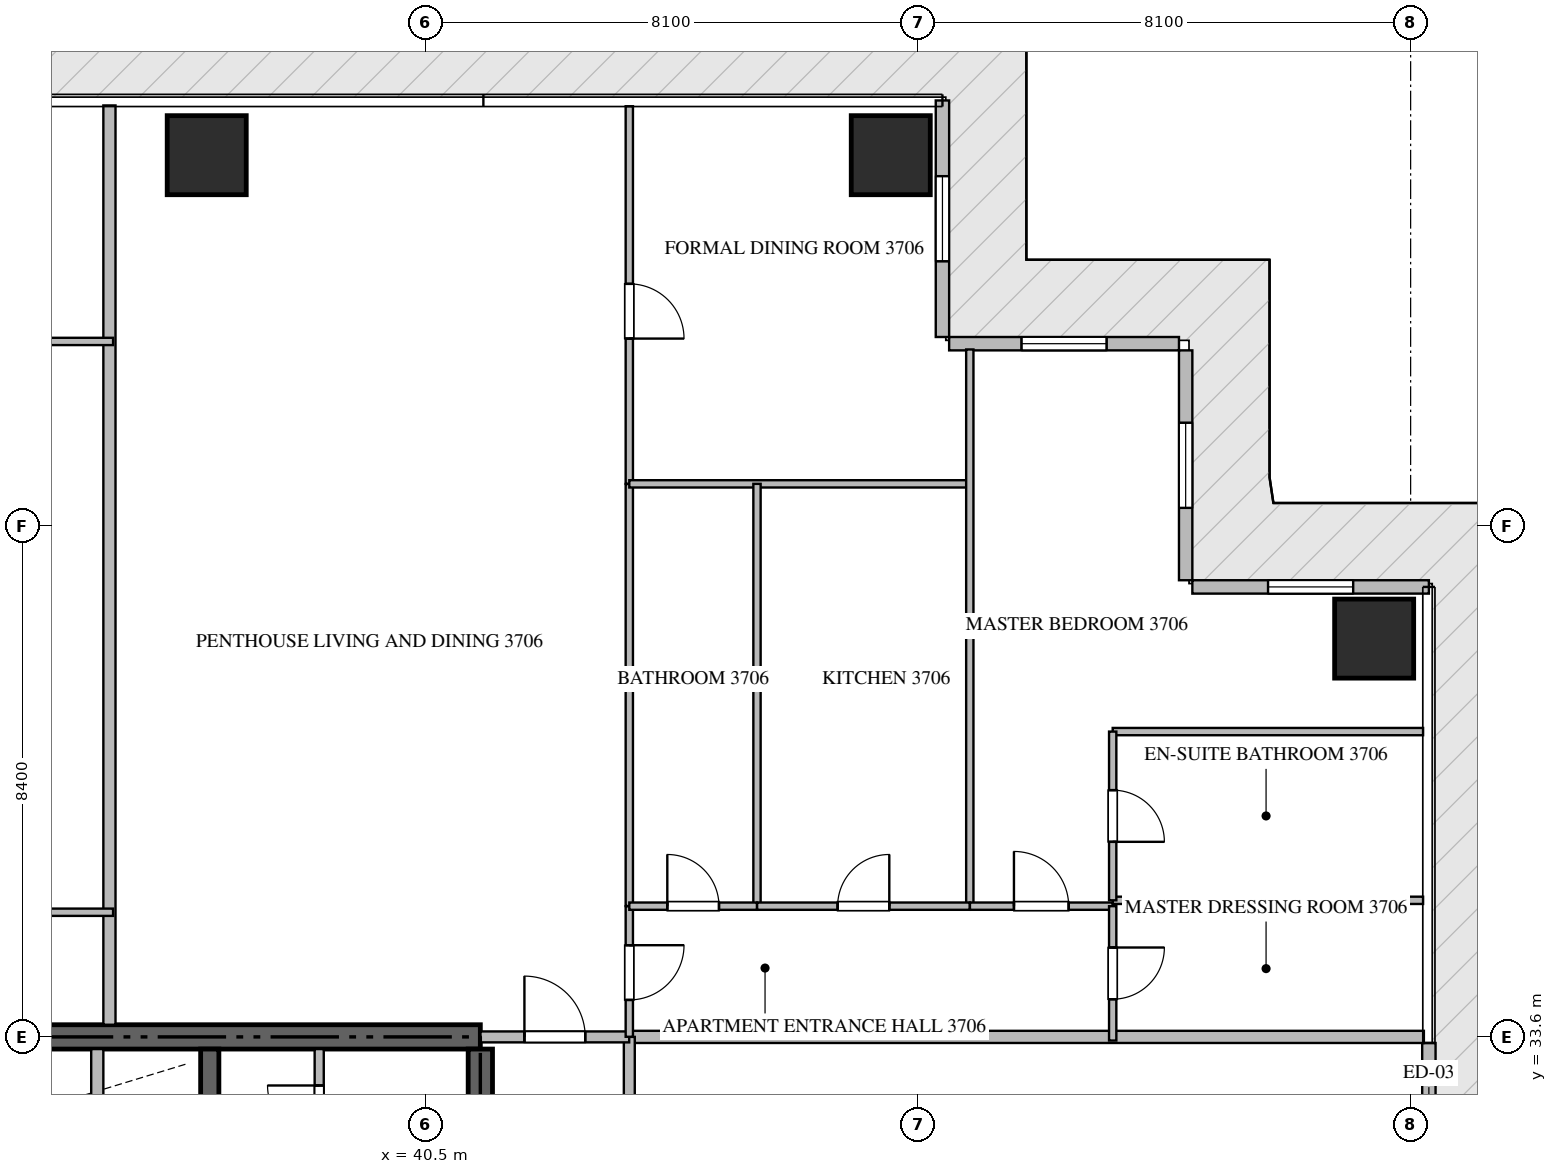
"""IFC4 building model, lengths in metres.
Left out: names, types, materials, properties, quantities, classifications, styles, units other than length and angle.
Written with IfcOpenShell. Run it as: python <this file> out.ifc"""

import sys

from ifc_helpers import new_model, si_unit, direction, frame, frame_2d, origin, origin_2d, place, context, subcontext, project, spatial, rectangle, extrude, source, transform, mapped, element, fill, save


model = new_model("IFC4")
c1 = context("Model", 3, precision=1e-05, world=origin(), true_north=direction((0.0, 1.0)))
c2 = subcontext(c1, "Body", "Model", "MODEL_VIEW")
j1 = project(units=[si_unit("LENGTHUNIT", "METRE"), si_unit("PLANEANGLEUNIT", "RADIAN")], contexts=[c1])
p1 = place(None, origin())
s1 = spatial("IfcSite", under=j1, at=p1, CompositionType="ELEMENT")
p2 = place(p1, origin())
s2 = spatial("IfcBuilding", under=s1, at=p2, CompositionType="ELEMENT")
p3 = place(p2, frame((0.0, 0.0, 150.15)))
s3 = spatial("IfcBuildingStorey", under=s2, at=p3, CompositionType="ELEMENT", Elevation=150.15)
p4 = place(p3, frame((41.4, 33.6, -0.26), z_axis=(0.0, 0.0, 1.0), x_axis=(-1.0, 0.0, 0.0)))
e1 = element("IfcWall", 1, at=p4, inside=s3, PredefinedType="SHEAR", context=c2, shape_type="SweptSolid", body=[
    extrude(rectangle(XDim=18.0, YDim=0.4, at=frame_2d((9.0, 0.0))), origin(), (0.0, 0.0, 1.0), 3.748),
])
p5 = place(p3, frame((41.4, 27.75, -0.26), z_axis=(0.0, 0.0, 1.0), x_axis=(0.0, 1.0, 0.0)))
e2 = element("IfcWall", 2, at=p5, inside=s3, PredefinedType="SHEAR", context=c2, shape_type="SweptSolid", body=[
    extrude(rectangle(XDim=5.65, YDim=0.4, at=frame_2d((2.825, 0.0))), origin(), (0.0, 0.0, 1.0), 3.748),
])
p6 = place(p3, frame((36.95, 27.05, -0.26), z_axis=(0.0, 0.0, 1.0), x_axis=(0.0, 1.0, 0.0)))
e3 = element("IfcWall", 3, at=p6, inside=s3, PredefinedType="SHEAR", context=c2, shape_type="SweptSolid", body=[
    extrude(rectangle(XDim=6.35, YDim=0.3, at=frame_2d((3.175, 0.0))), origin(), (0.0, 0.0, 1.0), 3.748),
])
m1 = source(origin(), c2, "Body", "SweptSolid", [
    extrude(rectangle(XDim=1.3, YDim=1.3, at=origin_2d()), origin(), (0.0, 0.0, 1.0), 3.75),
])
for number, where, z_axis, x_axis in (
    (4, (36.9, 48.1, -0.26), (0.0, 0.0, 1.0), (1.0, 0.0, 0.0)),
    (5, (48.15, 48.1, -0.26), (0.0, 0.0, 1.0), (1.0, 0.0, 0.0)),
    (6, (56.1, 40.15, -0.26), (0.0, 0.0, 1.0), (1.0, 0.0, 0.0)),
):
    element("IfcColumn", number, at=place(p3, frame(where, z_axis=z_axis, x_axis=x_axis)), inside=s3, PredefinedType="COLUMN", context=c2, shape_type="MappedRepresentation", body=[
        mapped(m1, transform((0.0, 0.0, 0.0), scale=1.0)),
    ])
p7 = place(p3, frame((57.0, 30.5, 0.0), z_axis=(0.0, 0.0, 1.0), x_axis=(0.0, 1.0, 0.0)))
e7 = element("IfcWall", 7, at=p7, inside=s3, PredefinedType="ELEMENTEDWALL", context=c2, shape_type="SweptSolid", body=[
    extrude(rectangle(XDim=3.0, YDim=0.22, at=frame_2d((1.5, 0.0))), origin(), (0.0, 0.0, 1.0), 3.475),
])
p8 = place(p7, frame((0.95, 0.0, 0.0)))
e8 = element("IfcOpeningElement", 8, at=p8, cuts=e7, PredefinedType="OPENING", context=c2, shape_type="SweptSolid", body=[
    extrude(rectangle(XDim=1.1, YDim=2.2, at=frame_2d((0.55, 1.1))), frame((0.0, 0.12, 0.0), z_axis=(0.0, -1.0, 0.0), x_axis=(1.0, 0.0, 0.0)), (0.0, 0.0, 1.0), 0.24),
])
p9 = place(p3, frame((57.0, 41.0, 0.0), z_axis=(0.0, 0.0, 1.0), x_axis=(-1.0, 0.0, 0.0)))
e9 = element("IfcWall", 9, at=p9, inside=s3, PredefinedType="ELEMENTEDWALL", context=c2, shape_type="SweptSolid", body=[
    extrude(rectangle(XDim=3.89, YDim=0.22, at=frame_2d((1.945, 0.0))), origin(), (0.0, 0.0, 1.0), 3.475),
])
p10 = place(p9, frame((1.245, 0.0, 0.65)))
e10 = element("IfcOpeningElement", 10, at=p10, cuts=e9, PredefinedType="OPENING", context=c2, shape_type="SweptSolid", body=[
    extrude(rectangle(XDim=1.4, YDim=2.05, at=frame_2d((0.7, 1.025))), frame((0.0, 0.12, 0.0), z_axis=(0.0, -1.0, 0.0), x_axis=(1.0, 0.0, 0.0)), (0.0, 0.0, 1.0), 0.24),
])
p11 = place(p3, frame((53.0, 41.11, 0.0), z_axis=(0.0, 0.0, 1.0), x_axis=(0.0, 1.0, 0.0)))
e11 = element("IfcWall", 11, at=p11, inside=s3, PredefinedType="ELEMENTEDWALL", context=c2, shape_type="SweptSolid", body=[
    extrude(rectangle(XDim=3.78, YDim=0.22, at=frame_2d((1.89, 0.0))), origin(), (0.0, 0.0, 1.0), 3.475),
])
p12 = place(p11, frame((1.19, 0.0, 0.65)))
e12 = element("IfcOpeningElement", 12, at=p12, cuts=e11, PredefinedType="OPENING", context=c2, shape_type="SweptSolid", body=[
    extrude(rectangle(XDim=1.4, YDim=2.05, at=frame_2d((0.7, 1.025))), frame((0.0, 0.12, 0.0), z_axis=(0.0, -1.0, 0.0), x_axis=(1.0, 0.0, 0.0)), (0.0, 0.0, 1.0), 0.24),
])
p13 = place(p3, frame((52.89, 45.0, 0.0), z_axis=(0.0, 0.0, 1.0), x_axis=(-1.0, 0.0, 0.0)))
e13 = element("IfcWall", 13, at=p13, inside=s3, PredefinedType="ELEMENTEDWALL", context=c2, shape_type="SweptSolid", body=[
    extrude(rectangle(XDim=3.78, YDim=0.22, at=frame_2d((1.89, 0.0))), origin(), (0.0, 0.0, 1.0), 3.475),
])
p14 = place(p13, frame((1.19, 0.0, 0.65)))
e14 = element("IfcOpeningElement", 14, at=p14, cuts=e13, PredefinedType="OPENING", context=c2, shape_type="SweptSolid", body=[
    extrude(rectangle(XDim=1.4, YDim=2.05, at=frame_2d((0.7, 1.025))), frame((0.0, 0.12, 0.0), z_axis=(0.0, -1.0, 0.0), x_axis=(1.0, 0.0, 0.0)), (0.0, 0.0, 1.0), 0.24),
])
p15 = place(p3, frame((49.0, 45.11, 0.0), z_axis=(0.0, 0.0, 1.0), x_axis=(0.0, 1.0, 0.0)))
e15 = element("IfcWall", 15, at=p15, inside=s3, PredefinedType="ELEMENTEDWALL", context=c2, shape_type="SweptSolid", body=[
    extrude(rectangle(XDim=3.89, YDim=0.22, at=frame_2d((1.945, 0.0))), origin(), (0.0, 0.0, 1.0), 3.475),
])
p16 = place(p15, frame((1.245, 0.0, 0.65)))
e16 = element("IfcOpeningElement", 16, at=p16, cuts=e15, PredefinedType="OPENING", context=c2, shape_type="SweptSolid", body=[
    extrude(rectangle(XDim=1.4, YDim=2.05, at=frame_2d((0.7, 1.025))), frame((0.0, 0.12, 0.0), z_axis=(0.0, -1.0, 0.0), x_axis=(1.0, 0.0, 0.0)), (0.0, 0.0, 1.0), 0.24),
])
p17 = place(p3, frame((35.1, 30.75, 0.0), z_axis=(0.0, 0.0, 1.0), x_axis=(0.0, 1.0, 0.0)))
e17 = element("IfcWall", 17, at=p17, inside=s3, PredefinedType="STANDARD", context=c2, shape_type="SweptSolid", body=[
    extrude(rectangle(XDim=2.65, YDim=0.2, at=frame_2d((1.325, 0.0))), origin(), (0.0, 0.0, 1.0), 3.49),
])
p18 = place(p3, frame((38.75, 31.352, 0.0), z_axis=(0.0, 0.0, 1.0), x_axis=(0.0, 1.0, 0.0)))
e18 = element("IfcWall", 18, at=p18, inside=s3, PredefinedType="PARTITIONING", context=c2, shape_type="SweptSolid", body=[
    extrude(rectangle(XDim=2.048, YDim=0.15, at=frame_2d((1.024, 0.0))), origin(), (0.0, 0.0, 1.0), 3.49),
])
p19 = place(p18, frame((0.599, 0.0, 0.0)))
e19 = element("IfcOpeningElement", 19, at=p19, cuts=e18, PredefinedType="OPENING", context=c2, shape_type="SweptSolid", body=[
    extrude(rectangle(XDim=0.85, YDim=2.1, at=frame_2d((0.425, 1.05))), frame((0.0, 0.085, 0.0), z_axis=(0.0, -1.0, 0.0), x_axis=(1.0, 0.0, 0.0)), (0.0, 0.0, 1.0), 0.17),
])
p20 = place(p3, frame((35.3, 33.8, 0.0), z_axis=(0.0, 0.0, 1.0), x_axis=(0.0, 1.0, 0.0)))
e20 = element("IfcWall", 20, at=p20, inside=s3, PredefinedType="PARTITIONING", context=c2, shape_type="SweptSolid", body=[
    extrude(rectangle(XDim=15.118, YDim=0.2, at=frame_2d((7.559, 0.0))), origin(), (0.0, 0.0, 1.0), 3.49),
])
p21 = place(p3, frame((43.85, 33.6, 0.0), z_axis=(0.0, 0.0, 1.0), x_axis=(1.0, 0.0, 0.0)))
e21 = element("IfcWall", 21, at=p21, inside=s3, PredefinedType="PARTITIONING", context=c2, shape_type="SweptSolid", body=[
    extrude(rectangle(XDim=13.068, YDim=0.2, at=frame_2d((6.534, 0.0))), origin(), (0.0, 0.0, 1.0), 3.49),
])
p22 = place(p3, frame((43.85, 14.9, 0.0), z_axis=(0.0, 0.0, 1.0), x_axis=(0.0, 1.0, 0.0)))
e22 = element("IfcWall", 22, at=p22, inside=s3, PredefinedType="PARTITIONING", context=c2, shape_type="SweptSolid", body=[
    extrude(rectangle(XDim=18.7, YDim=0.18, at=frame_2d((9.35, 0.0))), origin(), (0.0, 0.0, 1.0), 3.49),
])
p23 = place(p22, frame((14.603, 0.0, 0.0)))
e23 = element("IfcOpeningElement", 23, at=p23, cuts=e22, PredefinedType="OPENING", context=c2, shape_type="SweptSolid", body=[
    extrude(rectangle(XDim=1.0, YDim=2.15, at=frame_2d((0.5, 1.075))), frame((0.0, 0.1, 0.0), z_axis=(0.0, -1.0, 0.0), x_axis=(1.0, 0.0, 0.0)), (0.0, 0.0, 1.0), 0.2),
])
p24 = place(p3, frame((41.402, 33.6, 0.0), z_axis=(0.0, 0.0, 1.0), x_axis=(1.0, 0.0, 0.0)))
e24 = element("IfcWall", 24, at=p24, inside=s3, PredefinedType="PARTITIONING", context=c2, shape_type="SweptSolid", body=[
    extrude(rectangle(XDim=2.446, YDim=0.18, at=frame_2d((1.223, 0.0))), origin(), (0.0, 0.0, 1.0), 3.49),
])
p25 = place(p24, frame((0.723, 0.0, 0.0)))
e25 = element("IfcOpeningElement", 25, at=p25, cuts=e24, PredefinedType="OPENING", context=c2, shape_type="SweptSolid", body=[
    extrude(rectangle(XDim=1.0, YDim=2.15, at=frame_2d((0.5, 1.075))), frame((0.0, 0.1, 0.0), z_axis=(0.0, -1.0, 0.0), x_axis=(1.0, 0.0, 0.0)), (0.0, 0.0, 1.0), 0.2),
])
for number, where, z_axis, x_axis in (
    (26, (26.3, 45.037, 0.0), (0.0, 0.0, 1.0), (1.0, 0.0, 0.0)),
    (27, (26.3, 35.65, 0.0), (0.0, 0.0, 1.0), (1.0, 0.0, 0.0)),
):
    element("IfcWall", number, at=place(p3, frame(where, z_axis=z_axis, x_axis=x_axis)), inside=s3, PredefinedType="PARTITIONING", context=c2, shape_type="SweptSolid", body=[
        extrude(rectangle(XDim=9.06, YDim=0.12, at=frame_2d((4.53, 0.0))), origin(), (0.0, 0.0, 1.0), 3.49),
    ])
p26 = place(p3, frame((43.85, 35.75, 0.0), z_axis=(0.0, 0.0, 1.0), x_axis=(0.0, -1.0, 0.0)))
e28 = element("IfcWall", 28, at=p26, inside=s3, PredefinedType="PARTITIONING", context=c2, shape_type="SweptSolid", body=[
    extrude(rectangle(XDim=2.148, YDim=0.12, at=frame_2d((1.074, 0.0))), origin(), (0.0, 0.0, 1.0), 3.49),
])
p27 = place(p26, frame((0.642, 0.0, 0.0)))
e29 = element("IfcOpeningElement", 29, at=p27, cuts=e28, PredefinedType="OPENING", context=c2, shape_type="SweptSolid", body=[
    extrude(rectangle(XDim=0.9, YDim=2.1, at=frame_2d((0.45, 1.05))), frame((0.0, 0.07, 0.0), z_axis=(0.0, -1.0, 0.0), x_axis=(1.0, 0.0, 0.0)), (0.0, 0.0, 1.0), 0.14),
])
p28 = place(p3, frame((43.85, 48.905, 0.0), z_axis=(0.0, 0.0, 1.0), x_axis=(0.0, -1.0, 0.0)))
e30 = element("IfcWall", 30, at=p28, inside=s3, PredefinedType="PARTITIONING", context=c2, shape_type="SweptSolid", body=[
    extrude(rectangle(XDim=6.21, YDim=0.12, at=frame_2d((3.105, 0.0))), origin(), (0.0, 0.0, 1.0), 3.49),
])
p29 = place(p28, frame((2.921, 0.0, 0.0)))
e31 = element("IfcOpeningElement", 31, at=p29, cuts=e30, PredefinedType="OPENING", context=c2, shape_type="SweptSolid", body=[
    extrude(rectangle(XDim=0.9, YDim=2.1, at=frame_2d((0.45, 1.05))), frame((0.0, 0.07, 0.0), z_axis=(0.0, -1.0, 0.0), x_axis=(1.0, 0.0, 0.0)), (0.0, 0.0, 1.0), 0.14),
])
p30 = place(p3, frame((43.85, 42.693, 0.0), z_axis=(0.0, 0.0, 1.0), x_axis=(0.0, -1.0, 0.0)))
e32 = element("IfcWall", 32, at=p30, inside=s3, PredefinedType="PARTITIONING", context=c2, shape_type="SweptSolid", body=[
    extrude(rectangle(XDim=6.941, YDim=0.12, at=frame_2d((3.471, 0.0))), origin(), (0.0, 0.0, 1.0), 3.49),
])
p31 = place(p3, frame((43.85, 42.695, 0.0), z_axis=(0.0, 0.0, 1.0), x_axis=(1.0, 0.0, 0.0)))
e33 = element("IfcWall", 33, at=p31, inside=s3, PredefinedType="PARTITIONING", context=c2, shape_type="SweptSolid", body=[
    extrude(rectangle(XDim=5.6, YDim=0.12, at=frame_2d((2.8, 0.0))), origin(), (0.0, 0.0, 1.0), 3.49),
])
p32 = place(p3, frame((49.45, 44.905, 0.0), z_axis=(0.0, 0.0, 1.0), x_axis=(0.0, -1.0, 0.0)))
e34 = element("IfcWall", 34, at=p32, inside=s3, PredefinedType="PARTITIONING", context=c2, shape_type="SweptSolid", body=[
    extrude(rectangle(XDim=9.155, YDim=0.12, at=frame_2d((4.578, 0.0))), origin(), (0.0, 0.0, 1.0), 3.49),
])
p33 = place(p3, frame((45.95, 42.695, 0.0), z_axis=(0.0, 0.0, 1.0), x_axis=(0.0, -1.0, 0.0)))
e35 = element("IfcWall", 35, at=p33, inside=s3, PredefinedType="PARTITIONING", context=c2, shape_type="SweptSolid", body=[
    extrude(rectangle(XDim=6.945, YDim=0.12, at=frame_2d((3.473, 0.0))), origin(), (0.0, 0.0, 1.0), 3.49),
])
p34 = place(p3, frame((43.85, 35.75, 0.0), z_axis=(0.0, 0.0, 1.0), x_axis=(1.0, 0.0, 0.0)))
e36 = element("IfcWall", 36, at=p34, inside=s3, PredefinedType="PARTITIONING", context=c2, shape_type="SweptSolid", body=[
    extrude(rectangle(XDim=2.1, YDim=0.12, at=frame_2d((1.05, 0.0))), origin(), (0.0, 0.0, 1.0), 3.49),
])
p35 = place(p34, frame((0.625, 0.0, 0.0)))
e37 = element("IfcOpeningElement", 37, at=p35, cuts=e36, PredefinedType="OPENING", context=c2, shape_type="SweptSolid", body=[
    extrude(rectangle(XDim=0.85, YDim=2.1, at=frame_2d((0.425, 1.05))), frame((0.0, 0.07, 0.0), z_axis=(0.0, -1.0, 0.0), x_axis=(1.0, 0.0, 0.0)), (0.0, 0.0, 1.0), 0.14),
])
p36 = place(p3, frame((45.952, 35.75, 0.0), z_axis=(0.0, 0.0, 1.0), x_axis=(1.0, 0.0, 0.0)))
e38 = element("IfcWall", 38, at=p36, inside=s3, PredefinedType="PARTITIONING", context=c2, shape_type="SweptSolid", body=[
    extrude(rectangle(XDim=3.498, YDim=0.12, at=frame_2d((1.749, 0.0))), origin(), (0.0, 0.0, 1.0), 3.49),
])
p37 = place(p36, frame((1.324, 0.0, 0.0)))
e39 = element("IfcOpeningElement", 39, at=p37, cuts=e38, PredefinedType="OPENING", context=c2, shape_type="SweptSolid", body=[
    extrude(rectangle(XDim=0.85, YDim=2.1, at=frame_2d((0.425, 1.05))), frame((0.0, 0.07, 0.0), z_axis=(0.0, -1.0, 0.0), x_axis=(1.0, 0.0, 0.0)), (0.0, 0.0, 1.0), 0.14),
])
p38 = place(p3, frame((49.452, 35.75, 0.0), z_axis=(0.0, 0.0, 1.0), x_axis=(1.0, 0.0, 0.0)))
e40 = element("IfcWall", 40, at=p38, inside=s3, PredefinedType="PARTITIONING", context=c2, shape_type="SweptSolid", body=[
    extrude(rectangle(XDim=2.348, YDim=0.12, at=frame_2d((1.174, 0.0))), origin(), (0.0, 0.0, 1.0), 3.49),
])
p39 = place(p38, frame((0.724, 0.0, 0.0)))
e41 = element("IfcOpeningElement", 41, at=p39, cuts=e40, PredefinedType="OPENING", context=c2, shape_type="SweptSolid", body=[
    extrude(rectangle(XDim=0.9, YDim=2.1, at=frame_2d((0.45, 1.05))), frame((0.0, 0.07, 0.0), z_axis=(0.0, -1.0, 0.0), x_axis=(1.0, 0.0, 0.0)), (0.0, 0.0, 1.0), 0.14),
])
p40 = place(p3, frame((51.8, 38.621, 0.0), z_axis=(0.0, 0.0, 1.0), x_axis=(1.0, 0.0, 0.0)))
e42 = element("IfcWall", 42, at=p40, inside=s3, PredefinedType="PARTITIONING", context=c2, shape_type="SweptSolid", body=[
    extrude(rectangle(XDim=5.105, YDim=0.12, at=frame_2d((2.552, 0.0))), origin(), (0.0, 0.0, 1.0), 3.49),
])
p41 = place(p3, frame((51.802, 35.846, 0.0), z_axis=(0.0, 0.0, 1.0), x_axis=(1.0, 0.0, 0.0)))
e43 = element("IfcWall", 43, at=p41, inside=s3, PredefinedType="PARTITIONING", context=c2, shape_type="SweptSolid", body=[
    extrude(rectangle(XDim=5.103, YDim=0.12, at=frame_2d((2.552, 0.0))), origin(), (0.0, 0.0, 1.0), 3.49),
])
p42 = place(p3, frame((51.8, 38.621, 0.0), z_axis=(0.0, 0.0, 1.0), x_axis=(0.0, -1.0, 0.0)))
e44 = element("IfcWall", 44, at=p42, inside=s3, PredefinedType="PARTITIONING", context=c2, shape_type="SweptSolid", body=[
    extrude(rectangle(XDim=2.775, YDim=0.12, at=frame_2d((1.388, 0.0))), origin(), (0.0, 0.0, 1.0), 3.49),
])
p43 = place(p42, frame((0.963, 0.0, 0.0)))
e45 = element("IfcOpeningElement", 45, at=p43, cuts=e44, PredefinedType="OPENING", context=c2, shape_type="SweptSolid", body=[
    extrude(rectangle(XDim=0.85, YDim=2.1, at=frame_2d((0.425, 1.05))), frame((0.0, 0.07, 0.0), z_axis=(0.0, -1.0, 0.0), x_axis=(1.0, 0.0, 0.0)), (0.0, 0.0, 1.0), 0.14),
])
p44 = place(p3, frame((51.8, 35.75, 0.0), z_axis=(0.0, 0.0, 1.0), x_axis=(0.0, -1.0, 0.0)))
e46 = element("IfcWall", 46, at=p44, inside=s3, PredefinedType="PARTITIONING", context=c2, shape_type="SweptSolid", body=[
    extrude(rectangle(XDim=2.21, YDim=0.12, at=frame_2d((1.105, 0.0))), origin(), (0.0, 0.0, 1.0), 3.49),
])
p45 = place(p44, frame((0.68, 0.0, 0.0)))
e47 = element("IfcOpeningElement", 47, at=p45, cuts=e46, PredefinedType="OPENING", context=c2, shape_type="SweptSolid", body=[
    extrude(rectangle(XDim=0.85, YDim=2.1, at=frame_2d((0.425, 1.05))), frame((0.0, 0.07, 0.0), z_axis=(0.0, -1.0, 0.0), x_axis=(1.0, 0.0, 0.0)), (0.0, 0.0, 1.0), 0.14),
])
m2 = source(origin(), c2, "Body", "SweptSolid", [
    extrude(rectangle(XDim=1.4, YDim=2.05, at=frame_2d((0.7, 1.025))), frame((0.0, 0.03, 0.0), z_axis=(0.0, -1.0, 0.0), x_axis=(1.0, 0.0, 0.0)), (0.0, 0.0, 1.0), 0.06),
])
p46 = place(p10, origin())
e48 = element("IfcWindow", 48, at=p46, inside=s3, PartitioningType="SINGLE_PANEL", PredefinedType="WINDOW", context=c2, shape_type="MappedRepresentation", body=[
    mapped(m2, transform((0.0, 0.0, 0.0), scale=1.0)),
])
fill(e10, e48)
p47 = place(p12, origin())
e49 = element("IfcWindow", 49, at=p47, inside=s3, PartitioningType="SINGLE_PANEL", PredefinedType="WINDOW", context=c2, shape_type="MappedRepresentation", body=[
    mapped(m2, transform((0.0, 0.0, 0.0), scale=1.0)),
])
fill(e12, e49)
p48 = place(p14, origin())
e50 = element("IfcWindow", 50, at=p48, inside=s3, PartitioningType="SINGLE_PANEL", PredefinedType="WINDOW", context=c2, shape_type="MappedRepresentation", body=[
    mapped(m2, transform((0.0, 0.0, 0.0), scale=1.0)),
])
fill(e14, e50)
p49 = place(p16, origin())
e51 = element("IfcWindow", 51, at=p49, inside=s3, PartitioningType="SINGLE_PANEL", PredefinedType="WINDOW", context=c2, shape_type="MappedRepresentation", body=[
    mapped(m2, transform((0.0, 0.0, 0.0), scale=1.0)),
])
fill(e16, e51)
m3 = source(origin(), c2, "Body", "SweptSolid", [
    extrude(rectangle(XDim=0.85, YDim=2.1, at=frame_2d((0.425, 1.05))), frame((0.0, 0.025, 0.0), z_axis=(0.0, -1.0, 0.0), x_axis=(1.0, 0.0, 0.0)), (0.0, 0.0, 1.0), 0.05),
])
p50 = place(p19, origin())
e52 = element("IfcDoor", 52, at=p50, inside=s3, OperationType="SINGLE_SWING_RIGHT", PredefinedType="DOOR", context=c2, shape_type="MappedRepresentation", body=[
    mapped(m3, transform((0.0, 0.0, 0.0), scale=1.0)),
])
fill(e19, e52)
m4 = source(origin(), c2, "Body", "SweptSolid", [
    extrude(rectangle(XDim=1.0, YDim=2.15, at=frame_2d((0.5, 1.075))), frame((0.0, 0.025, 0.0), z_axis=(0.0, -1.0, 0.0), x_axis=(1.0, 0.0, 0.0)), (0.0, 0.0, 1.0), 0.05),
])
p51 = place(p25, origin())
e53 = element("IfcDoor", 53, at=p51, inside=s3, OperationType="SINGLE_SWING_LEFT", PredefinedType="DOOR", context=c2, shape_type="MappedRepresentation", body=[
    mapped(m4, transform((0.0, 0.0, 0.0), scale=1.0)),
])
fill(e25, e53)
m5 = source(origin(), c2, "Body", "SweptSolid", [
    extrude(rectangle(XDim=0.9, YDim=2.1, at=frame_2d((0.45, 1.05))), frame((0.0, 0.025, 0.0), z_axis=(0.0, -1.0, 0.0), x_axis=(1.0, 0.0, 0.0)), (0.0, 0.0, 1.0), 0.05),
])
p52 = place(p27, origin())
e54 = element("IfcDoor", 54, at=p52, inside=s3, OperationType="SINGLE_SWING_LEFT", PredefinedType="DOOR", context=c2, shape_type="MappedRepresentation", body=[
    mapped(m5, transform((0.0, 0.0, 0.0), scale=1.0)),
])
fill(e29, e54)
p53 = place(p29, origin())
e55 = element("IfcDoor", 55, at=p53, inside=s3, OperationType="SINGLE_SWING_RIGHT", PredefinedType="DOOR", context=c2, shape_type="MappedRepresentation", body=[
    mapped(m5, transform((0.0, 0.0, 0.0), scale=1.0)),
])
fill(e31, e55)
p54 = place(p35, origin())
e56 = element("IfcDoor", 56, at=p54, inside=s3, OperationType="SINGLE_SWING_LEFT", PredefinedType="DOOR", context=c2, shape_type="MappedRepresentation", body=[
    mapped(m3, transform((0.0, 0.0, 0.0), scale=1.0)),
])
fill(e37, e56)
p55 = place(p37, origin())
e57 = element("IfcDoor", 57, at=p55, inside=s3, OperationType="SINGLE_SWING_RIGHT", PredefinedType="DOOR", context=c2, shape_type="MappedRepresentation", body=[
    mapped(m3, transform((0.0, 0.0, 0.0), scale=1.0)),
])
fill(e39, e57)
p56 = place(p39, origin())
e58 = element("IfcDoor", 58, at=p56, inside=s3, OperationType="SINGLE_SWING_LEFT", PredefinedType="DOOR", context=c2, shape_type="MappedRepresentation", body=[
    mapped(m5, transform((0.0, 0.0, 0.0), scale=1.0)),
])
fill(e41, e58)
p57 = place(p43, origin())
e59 = element("IfcDoor", 59, at=p57, inside=s3, OperationType="SINGLE_SWING_RIGHT", PredefinedType="DOOR", context=c2, shape_type="MappedRepresentation", body=[
    mapped(m3, transform((0.0, 0.0, 0.0), scale=1.0)),
])
fill(e45, e59)
p58 = place(p45, origin())
e60 = element("IfcDoor", 60, at=p58, inside=s3, OperationType="SINGLE_SWING_LEFT", PredefinedType="DOOR", context=c2, shape_type="MappedRepresentation", body=[
    mapped(m3, transform((0.0, 0.0, 0.0), scale=1.0)),
])
fill(e47, e60)
save(model, sys.argv[1])
